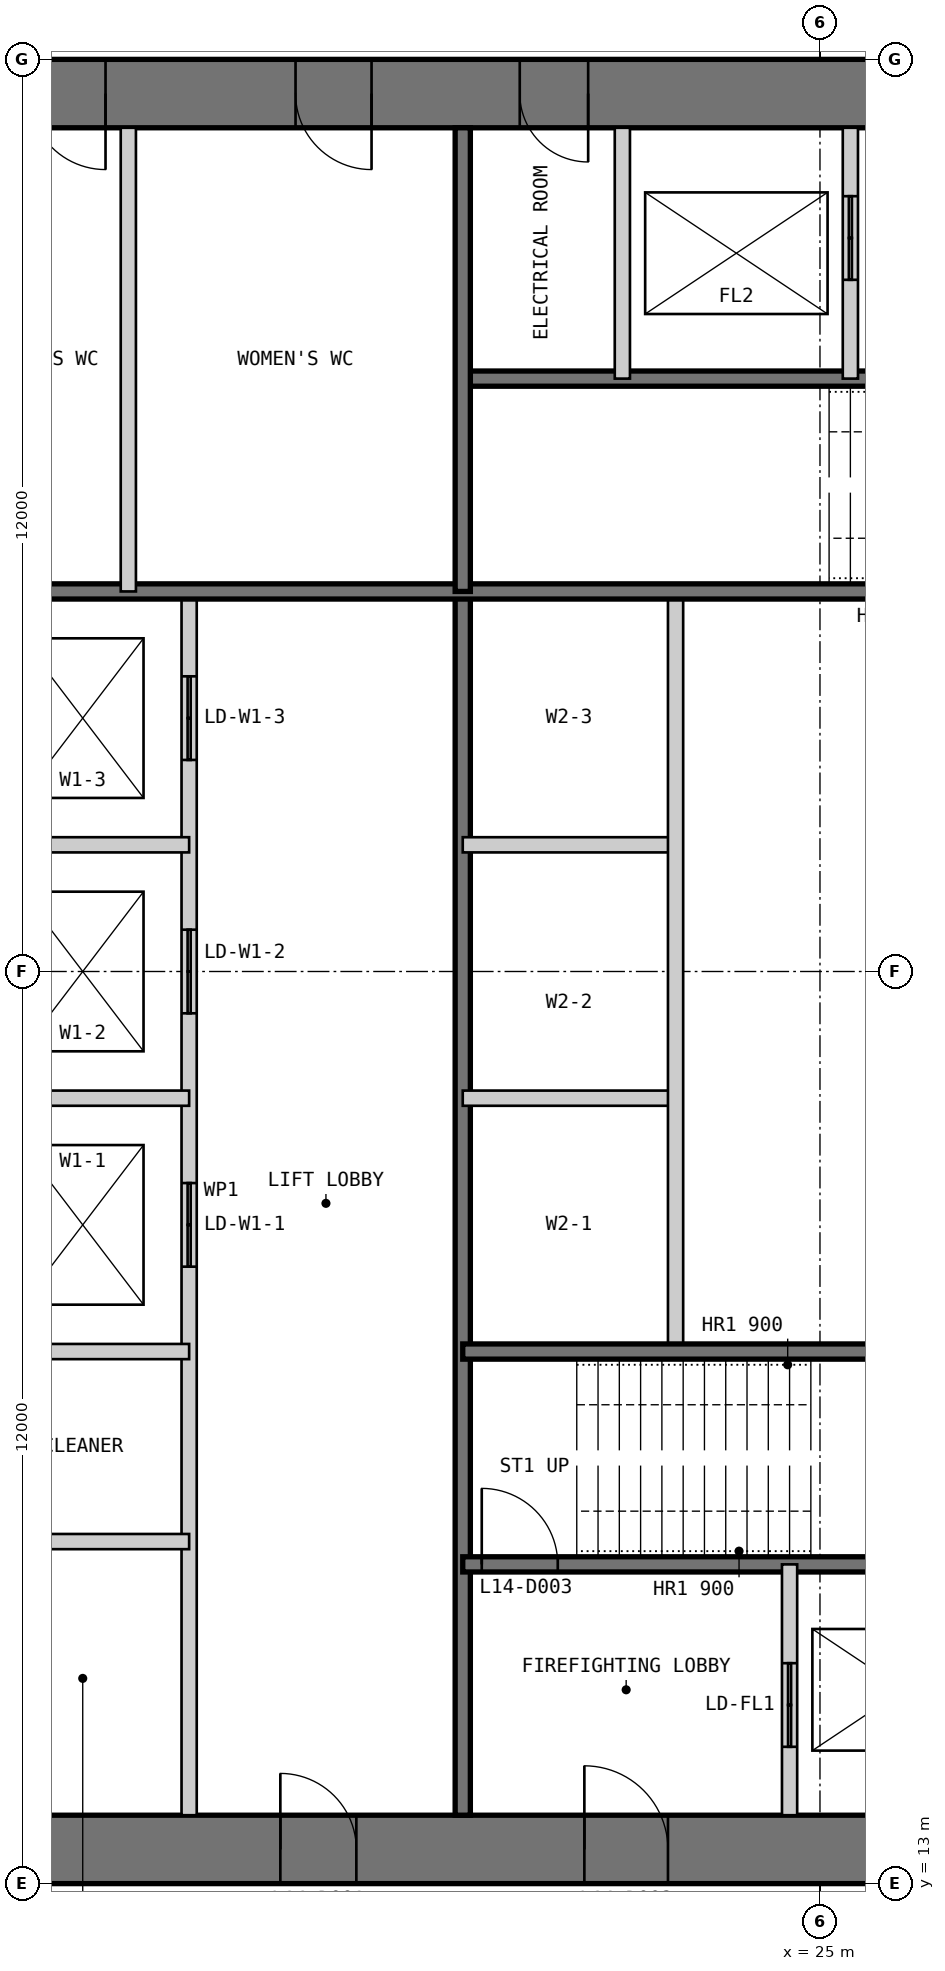
"""IFC4 building model, lengths in metres.
Left out: names, types, materials, properties, quantities, classifications, styles, units other than length and angle.
Written with IfcOpenShell. Run it as: python <this file> out.ifc"""

import sys

from ifc_helpers import new_model, si_unit, direction, frame, frame_2d, origin, place, context, subcontext, project, spatial, polyline, rectangle, outline, extrude, element, fill, save


model = new_model("IFC4")
c1 = context("Model", 3, precision=1e-05, world=origin(), true_north=direction((0.0, 1.0)))
c2 = subcontext(c1, "Body", "Model", "MODEL_VIEW")
j1 = project(units=[si_unit("LENGTHUNIT", "METRE"), si_unit("PLANEANGLEUNIT", "RADIAN")], contexts=[c1])
p1 = place(None, origin())
s1 = spatial("IfcSite", under=j1, at=p1, CompositionType="ELEMENT")
p2 = place(p1, origin())
s2 = spatial("IfcBuilding", under=s1, at=p2, CompositionType="ELEMENT")
p3 = place(p2, frame((0.0, 0.0, 63.0)))
s3 = spatial("IfcBuildingStorey", under=s2, at=p3, CompositionType="ELEMENT", Elevation=63.0)
p4 = place(p3, frame((13.0, 13.45, 0.0), z_axis=(0.0, 0.0, 1.0), x_axis=(1.0, 0.0, 0.0)))
e1 = element("IfcWall", 1, at=p4, inside=s3, PredefinedType="SHEAR", context=c2, shape_type="SweptSolid", body=[
    extrude(outline(polyline([(0.0, -0.45), (24.0, -0.45), (23.1, 0.45), (0.9, 0.45), (0.0, -0.45)])), origin(), (0.0, 0.0, 1.0), 4.0),
])
p5 = place(p4, frame((4.9, 0.0, 0.0)))
e2 = element("IfcOpeningElement", 2, at=p5, cuts=e1, PredefinedType="OPENING", context=c2, shape_type="SweptSolid", body=[
    extrude(rectangle(XDim=1.0, YDim=2.2, at=frame_2d((0.5, 1.1))), frame((0.0, 0.46, 0.0), z_axis=(0.0, -1.0, 0.0), x_axis=(1.0, 0.0, 0.0)), (0.0, 0.0, 1.0), 0.92),
])
p6 = place(p4, frame((8.9, 0.0, 0.0)))
e3 = element("IfcOpeningElement", 3, at=p6, cuts=e1, PredefinedType="OPENING", context=c2, shape_type="SweptSolid", body=[
    extrude(rectangle(XDim=1.1, YDim=2.2, at=frame_2d((0.55, 1.1))), frame((0.0, 0.46, 0.0), z_axis=(0.0, -1.0, 0.0), x_axis=(1.0, 0.0, 0.0)), (0.0, 0.0, 1.0), 0.92),
])
p7 = place(p4, frame((15.05, 0.0, 0.0)))
e4 = element("IfcOpeningElement", 4, at=p7, cuts=e1, PredefinedType="OPENING", context=c2, shape_type="SweptSolid", body=[
    extrude(rectangle(XDim=0.9, YDim=2.2, at=frame_2d((0.45, 1.1))), frame((0.0, 0.46, 0.0), z_axis=(0.0, -1.0, 0.0), x_axis=(1.0, 0.0, 0.0)), (0.0, 0.0, 1.0), 0.92),
])
p8 = place(p4, frame((17.9, 0.0, 0.0)))
e5 = element("IfcOpeningElement", 5, at=p8, cuts=e1, PredefinedType="OPENING", context=c2, shape_type="SweptSolid", body=[
    extrude(rectangle(XDim=1.0, YDim=2.2, at=frame_2d((0.5, 1.1))), frame((0.0, 0.46, 0.0), z_axis=(0.0, -1.0, 0.0), x_axis=(1.0, 0.0, 0.0)), (0.0, 0.0, 1.0), 0.92),
])
p9 = place(p4, frame((21.4, 0.0, 0.0)))
e6 = element("IfcOpeningElement", 6, at=p9, cuts=e1, PredefinedType="OPENING", context=c2, shape_type="SweptSolid", body=[
    extrude(rectangle(XDim=1.0, YDim=2.2, at=frame_2d((0.5, 1.1))), frame((0.0, 0.46, 0.0), z_axis=(0.0, -1.0, 0.0), x_axis=(1.0, 0.0, 0.0)), (0.0, 0.0, 1.0), 0.92),
])
p10 = place(p3, frame((37.0, 36.55, 0.0), z_axis=(0.0, 0.0, 1.0), x_axis=(-1.0, 0.0, 0.0)))
e7 = element("IfcWall", 7, at=p10, inside=s3, PredefinedType="SHEAR", context=c2, shape_type="SweptSolid", body=[
    extrude(outline(polyline([(0.0, -0.45), (24.0, -0.45), (23.1, 0.45), (0.9, 0.45), (0.0, -0.45)])), origin(), (0.0, 0.0, 1.0), 4.0),
])
p11 = place(p10, frame((4.9, 0.0, 0.0)))
e8 = element("IfcOpeningElement", 8, at=p11, cuts=e7, PredefinedType="OPENING", context=c2, shape_type="SweptSolid", body=[
    extrude(rectangle(XDim=1.0, YDim=2.2, at=frame_2d((0.5, 1.1))), frame((0.0, 0.46, 0.0), z_axis=(0.0, -1.0, 0.0), x_axis=(1.0, 0.0, 0.0)), (0.0, 0.0, 1.0), 0.92),
])
p12 = place(p10, frame((8.9, 0.0, 0.0)))
e9 = element("IfcOpeningElement", 9, at=p12, cuts=e7, PredefinedType="OPENING", context=c2, shape_type="SweptSolid", body=[
    extrude(rectangle(XDim=1.1, YDim=2.2, at=frame_2d((0.55, 1.1))), frame((0.0, 0.46, 0.0), z_axis=(0.0, -1.0, 0.0), x_axis=(1.0, 0.0, 0.0)), (0.0, 0.0, 1.0), 0.92),
])
p13 = place(p10, frame((15.05, 0.0, 0.0)))
e10 = element("IfcOpeningElement", 10, at=p13, cuts=e7, PredefinedType="OPENING", context=c2, shape_type="SweptSolid", body=[
    extrude(rectangle(XDim=0.9, YDim=2.2, at=frame_2d((0.45, 1.1))), frame((0.0, 0.46, 0.0), z_axis=(0.0, -1.0, 0.0), x_axis=(1.0, 0.0, 0.0)), (0.0, 0.0, 1.0), 0.92),
])
p14 = place(p10, frame((17.9, 0.0, 0.0)))
e11 = element("IfcOpeningElement", 11, at=p14, cuts=e7, PredefinedType="OPENING", context=c2, shape_type="SweptSolid", body=[
    extrude(rectangle(XDim=1.0, YDim=2.2, at=frame_2d((0.5, 1.1))), frame((0.0, 0.46, 0.0), z_axis=(0.0, -1.0, 0.0), x_axis=(1.0, 0.0, 0.0)), (0.0, 0.0, 1.0), 0.92),
])
p15 = place(p10, frame((21.4, 0.0, 0.0)))
e12 = element("IfcOpeningElement", 12, at=p15, cuts=e7, PredefinedType="OPENING", context=c2, shape_type="SweptSolid", body=[
    extrude(rectangle(XDim=1.0, YDim=2.2, at=frame_2d((0.5, 1.1))), frame((0.0, 0.46, 0.0), z_axis=(0.0, -1.0, 0.0), x_axis=(1.0, 0.0, 0.0)), (0.0, 0.0, 1.0), 0.92),
])
p16 = place(p3, frame((16.7, 13.9, 0.0), z_axis=(0.0, 0.0, 1.0), x_axis=(0.0, 1.0, 0.0)))
e13 = element("IfcWall", 13, at=p16, inside=s3, PredefinedType="PARTITIONING", context=c2, shape_type="SweptSolid", body=[
    extrude(rectangle(XDim=16.1, YDim=0.2, at=frame_2d((8.05, 0.0))), origin(), (0.0, 0.0, 1.0), 3.8),
])
p17 = place(p16, frame((7.217, 0.0, 0.0)))
e14 = element("IfcOpeningElement", 14, at=p17, cuts=e13, PredefinedType="OPENING", context=c2, shape_type="SweptSolid", body=[
    extrude(rectangle(XDim=1.1, YDim=2.2, at=frame_2d((0.55, 1.1))), frame((0.0, 0.11, 0.0), z_axis=(0.0, -1.0, 0.0), x_axis=(1.0, 0.0, 0.0)), (0.0, 0.0, 1.0), 0.22),
])
p18 = place(p16, frame((10.55, 0.0, 0.0)))
e15 = element("IfcOpeningElement", 15, at=p18, cuts=e13, PredefinedType="OPENING", context=c2, shape_type="SweptSolid", body=[
    extrude(rectangle(XDim=1.1, YDim=2.2, at=frame_2d((0.55, 1.1))), frame((0.0, 0.11, 0.0), z_axis=(0.0, -1.0, 0.0), x_axis=(1.0, 0.0, 0.0)), (0.0, 0.0, 1.0), 0.22),
])
p19 = place(p16, frame((13.883, 0.0, 0.0)))
e16 = element("IfcOpeningElement", 16, at=p19, cuts=e13, PredefinedType="OPENING", context=c2, shape_type="SweptSolid", body=[
    extrude(rectangle(XDim=1.1, YDim=2.2, at=frame_2d((0.55, 1.1))), frame((0.0, 0.11, 0.0), z_axis=(0.0, -1.0, 0.0), x_axis=(1.0, 0.0, 0.0)), (0.0, 0.0, 1.0), 0.22),
])
p20 = place(p3, frame((20.3, 13.9, 0.0), z_axis=(0.0, 0.0, 1.0), x_axis=(0.0, 1.0, 0.0)))
e17 = element("IfcWall", 17, at=p20, inside=s3, PredefinedType="SOLIDWALL", context=c2, shape_type="SweptSolid", body=[
    extrude(rectangle(XDim=16.1, YDim=0.2, at=frame_2d((8.05, 0.0))), origin(), (0.0, 0.0, 1.0), 3.8),
])
for number, where, z_axis, x_axis in (
    (18, (13.9, 20.0, 0.0), (0.0, 0.0, 1.0), (1.0, 0.0, 0.0)),
    (19, (13.9, 23.333, 0.0), (0.0, 0.0, 1.0), (1.0, 0.0, 0.0)),
    (20, (13.9, 26.667, 0.0), (0.0, 0.0, 1.0), (1.0, 0.0, 0.0)),
    (21, (20.3, 23.333, 0.0), (0.0, 0.0, 1.0), (1.0, 0.0, 0.0)),
    (22, (20.3, 26.667, 0.0), (0.0, 0.0, 1.0), (1.0, 0.0, 0.0)),
):
    element("IfcWall", number, at=place(p3, frame(where, z_axis=z_axis, x_axis=x_axis)), inside=s3, PredefinedType="PARTITIONING", context=c2, shape_type="SweptSolid", body=[
        extrude(rectangle(XDim=2.8, YDim=0.2, at=frame_2d((1.4, 0.0))), origin(), (0.0, 0.0, 1.0), 3.8),
    ])
p21 = place(p3, frame((23.1, 20.0, 0.0), z_axis=(0.0, 0.0, 1.0), x_axis=(0.0, 1.0, 0.0)))
e23 = element("IfcWall", 23, at=p21, inside=s3, PredefinedType="PARTITIONING", context=c2, shape_type="SweptSolid", body=[
    extrude(rectangle(XDim=10.0, YDim=0.2, at=frame_2d((5.0, 0.0))), origin(), (0.0, 0.0, 1.0), 3.8),
])
p22 = place(p3, frame((20.3, 17.2, 0.0), z_axis=(0.0, 0.0, 1.0), x_axis=(1.0, 0.0, 0.0)))
e24 = element("IfcWall", 24, at=p22, inside=s3, PredefinedType="SOLIDWALL", context=c2, shape_type="SweptSolid", body=[
    extrude(rectangle(XDim=9.4, YDim=0.2, at=frame_2d((4.7, 0.0))), origin(), (0.0, 0.0, 1.0), 3.8),
])
p23 = place(p22, frame((0.25, 0.0, 0.0)))
e25 = element("IfcOpeningElement", 25, at=p23, cuts=e24, PredefinedType="OPENING", context=c2, shape_type="SweptSolid", body=[
    extrude(rectangle(XDim=1.0, YDim=2.2, at=frame_2d((0.5, 1.1))), frame((0.0, 0.11, 0.0), z_axis=(0.0, -1.0, 0.0), x_axis=(1.0, 0.0, 0.0)), (0.0, 0.0, 1.0), 0.22),
])
p24 = place(p3, frame((20.3, 20.0, 0.0), z_axis=(0.0, 0.0, 1.0), x_axis=(1.0, 0.0, 0.0)))
e26 = element("IfcWall", 26, at=p24, inside=s3, PredefinedType="SOLIDWALL", context=c2, shape_type="SweptSolid", body=[
    extrude(rectangle(XDim=15.8, YDim=0.2, at=frame_2d((7.9, 0.0))), origin(), (0.0, 0.0, 1.0), 3.8),
])
p25 = place(p3, frame((24.6, 13.9, 0.0), z_axis=(0.0, 0.0, 1.0), x_axis=(0.0, 1.0, 0.0)))
e27 = element("IfcWall", 27, at=p25, inside=s3, PredefinedType="PARTITIONING", context=c2, shape_type="SweptSolid", body=[
    extrude(rectangle(XDim=3.3, YDim=0.2, at=frame_2d((1.65, 0.0))), origin(), (0.0, 0.0, 1.0), 3.8),
])
p26 = place(p25, frame((0.9, 0.0, 0.0)))
e28 = element("IfcOpeningElement", 28, at=p26, cuts=e27, PredefinedType="OPENING", context=c2, shape_type="SweptSolid", body=[
    extrude(rectangle(XDim=1.1, YDim=2.2, at=frame_2d((0.55, 1.1))), frame((0.0, 0.11, 0.0), z_axis=(0.0, -1.0, 0.0), x_axis=(1.0, 0.0, 0.0)), (0.0, 0.0, 1.0), 0.22),
])
p27 = place(p3, frame((13.9, 17.5, 0.0), z_axis=(0.0, 0.0, 1.0), x_axis=(1.0, 0.0, 0.0)))
e29 = element("IfcWall", 29, at=p27, inside=s3, PredefinedType="PARTITIONING", context=c2, shape_type="SweptSolid", body=[
    extrude(rectangle(XDim=2.8, YDim=0.2, at=frame_2d((1.4, 0.0))), origin(), (0.0, 0.0, 1.0), 3.8),
])
p28 = place(p3, frame((29.7, 32.8, 0.0), z_axis=(0.0, 0.0, 1.0), x_axis=(-1.0, 0.0, 0.0)))
e30 = element("IfcWall", 30, at=p28, inside=s3, PredefinedType="SOLIDWALL", context=c2, shape_type="SweptSolid", body=[
    extrude(rectangle(XDim=9.4, YDim=0.2, at=frame_2d((4.7, 0.0))), origin(), (0.0, 0.0, 1.0), 3.8),
])
p29 = place(p28, frame((0.25, 0.0, 0.0)))
e31 = element("IfcOpeningElement", 31, at=p29, cuts=e30, PredefinedType="OPENING", context=c2, shape_type="SweptSolid", body=[
    extrude(rectangle(XDim=1.0, YDim=2.2, at=frame_2d((0.5, 1.1))), frame((0.0, 0.11, 0.0), z_axis=(0.0, -1.0, 0.0), x_axis=(1.0, 0.0, 0.0)), (0.0, 0.0, 1.0), 0.22),
])
p30 = place(p3, frame((29.7, 30.0, 0.0), z_axis=(0.0, 0.0, 1.0), x_axis=(-1.0, 0.0, 0.0)))
e32 = element("IfcWall", 32, at=p30, inside=s3, PredefinedType="SOLIDWALL", context=c2, shape_type="SweptSolid", body=[
    extrude(rectangle(XDim=15.8, YDim=0.2, at=frame_2d((7.9, 0.0))), origin(), (0.0, 0.0, 1.0), 3.8),
])
p31 = place(p3, frame((25.4, 36.1, 0.0), z_axis=(0.0, 0.0, 1.0), x_axis=(0.0, -1.0, 0.0)))
e33 = element("IfcWall", 33, at=p31, inside=s3, PredefinedType="PARTITIONING", context=c2, shape_type="SweptSolid", body=[
    extrude(rectangle(XDim=3.3, YDim=0.2, at=frame_2d((1.65, 0.0))), origin(), (0.0, 0.0, 1.0), 3.8),
])
p32 = place(p31, frame((0.9, 0.0, 0.0)))
e34 = element("IfcOpeningElement", 34, at=p32, cuts=e33, PredefinedType="OPENING", context=c2, shape_type="SweptSolid", body=[
    extrude(rectangle(XDim=1.1, YDim=2.2, at=frame_2d((0.55, 1.1))), frame((0.0, 0.11, 0.0), z_axis=(0.0, -1.0, 0.0), x_axis=(1.0, 0.0, 0.0)), (0.0, 0.0, 1.0), 0.22),
])
p33 = place(p3, frame((22.4, 36.1, 0.0), z_axis=(0.0, 0.0, 1.0), x_axis=(0.0, -1.0, 0.0)))
e35 = element("IfcWall", 35, at=p33, inside=s3, PredefinedType="PARTITIONING", context=c2, shape_type="SweptSolid", body=[
    extrude(rectangle(XDim=3.3, YDim=0.2, at=frame_2d((1.65, 0.0))), origin(), (0.0, 0.0, 1.0), 3.8),
])
p34 = place(p3, frame((20.3, 36.1, 0.0), z_axis=(0.0, 0.0, 1.0), x_axis=(0.0, -1.0, 0.0)))
e36 = element("IfcWall", 36, at=p34, inside=s3, PredefinedType="SOLIDWALL", context=c2, shape_type="SweptSolid", body=[
    extrude(rectangle(XDim=6.1, YDim=0.2, at=frame_2d((3.05, 0.0))), origin(), (0.0, 0.0, 1.0), 3.8),
])
p35 = place(p3, frame((15.9, 36.1, 0.0), z_axis=(0.0, 0.0, 1.0), x_axis=(0.0, -1.0, 0.0)))
e37 = element("IfcWall", 37, at=p35, inside=s3, PredefinedType="PARTITIONING", context=c2, shape_type="SweptSolid", body=[
    extrude(rectangle(XDim=6.1, YDim=0.2, at=frame_2d((3.05, 0.0))), origin(), (0.0, 0.0, 1.0), 3.8),
])
p36 = place(p5, origin())
e38 = element("IfcDoor", 38, at=p36, inside=s3, OperationType="SINGLE_SWING_LEFT", PredefinedType="DOOR", context=c2, shape_type="SweptSolid", body=[
    extrude(rectangle(XDim=1.0, YDim=2.2, at=frame_2d((0.5, 1.1))), frame((0.0, 0.025, 0.0), z_axis=(0.0, -1.0, 0.0), x_axis=(1.0, 0.0, 0.0)), (0.0, 0.0, 1.0), 0.05),
    extrude(outline(polyline([(0.0, 0.0), (0.04, 0.0), (0.04, 2.16), (0.96, 2.16), (0.96, 0.0), (1.0, 0.0), (1.0, 2.2), (0.0, 2.2), (0.0, 0.0)])), frame((0.0, 0.3, 0.0), z_axis=(0.0, -1.0, 0.0), x_axis=(1.0, 0.0, 0.0)), (0.0, 0.0, 1.0), 0.6),
])
fill(e2, e38)
p37 = place(p6, origin())
e39 = element("IfcDoor", 39, at=p37, inside=s3, OperationType="SINGLE_SWING_LEFT", PredefinedType="DOOR", context=c2, shape_type="SweptSolid", body=[
    extrude(rectangle(XDim=1.1, YDim=2.2, at=frame_2d((0.55, 1.1))), frame((0.0, 0.025, 0.0), z_axis=(0.0, -1.0, 0.0), x_axis=(1.0, 0.0, 0.0)), (0.0, 0.0, 1.0), 0.05),
    extrude(outline(polyline([(0.0, 0.0), (0.04, 0.0), (0.04, 2.16), (1.06, 2.16), (1.06, 0.0), (1.1, 0.0), (1.1, 2.2), (0.0, 2.2), (0.0, 0.0)])), frame((0.0, 0.3, 0.0), z_axis=(0.0, -1.0, 0.0), x_axis=(1.0, 0.0, 0.0)), (0.0, 0.0, 1.0), 0.6),
])
fill(e3, e39)
p38 = place(p23, origin())
e40 = element("IfcDoor", 40, at=p38, inside=s3, OperationType="SINGLE_SWING_LEFT", PredefinedType="DOOR", context=c2, shape_type="SweptSolid", body=[
    extrude(rectangle(XDim=1.0, YDim=2.2, at=frame_2d((0.5, 1.1))), frame((0.0, 0.025, 0.0), z_axis=(0.0, -1.0, 0.0), x_axis=(1.0, 0.0, 0.0)), (0.0, 0.0, 1.0), 0.05),
])
fill(e25, e40)
p39 = place(p13, origin())
e41 = element("IfcDoor", 41, at=p39, inside=s3, OperationType="SINGLE_SWING_LEFT", PredefinedType="DOOR", context=c2, shape_type="SweptSolid", body=[
    extrude(rectangle(XDim=0.9, YDim=2.2, at=frame_2d((0.45, 1.1))), frame((0.0, 0.025, 0.0), z_axis=(0.0, -1.0, 0.0), x_axis=(1.0, 0.0, 0.0)), (0.0, 0.0, 1.0), 0.05),
    extrude(outline(polyline([(0.0, 0.0), (0.04, 0.0), (0.04, 2.16), (0.86, 2.16), (0.86, 0.0), (0.9, 0.0), (0.9, 2.2), (0.0, 2.2), (0.0, 0.0)])), frame((0.0, 0.3, 0.0), z_axis=(0.0, -1.0, 0.0), x_axis=(1.0, 0.0, 0.0)), (0.0, 0.0, 1.0), 0.6),
])
fill(e10, e41)
p40 = place(p14, origin())
e42 = element("IfcDoor", 42, at=p40, inside=s3, OperationType="SINGLE_SWING_LEFT", PredefinedType="DOOR", context=c2, shape_type="SweptSolid", body=[
    extrude(rectangle(XDim=1.0, YDim=2.2, at=frame_2d((0.5, 1.1))), frame((0.0, 0.025, 0.0), z_axis=(0.0, -1.0, 0.0), x_axis=(1.0, 0.0, 0.0)), (0.0, 0.0, 1.0), 0.05),
    extrude(outline(polyline([(0.0, 0.0), (0.04, 0.0), (0.04, 2.16), (0.96, 2.16), (0.96, 0.0), (1.0, 0.0), (1.0, 2.2), (0.0, 2.2), (0.0, 0.0)])), frame((0.0, 0.3, 0.0), z_axis=(0.0, -1.0, 0.0), x_axis=(1.0, 0.0, 0.0)), (0.0, 0.0, 1.0), 0.6),
])
fill(e11, e42)
p41 = place(p15, origin())
e43 = element("IfcDoor", 43, at=p41, inside=s3, OperationType="SINGLE_SWING_LEFT", PredefinedType="DOOR", context=c2, shape_type="SweptSolid", body=[
    extrude(rectangle(XDim=1.0, YDim=2.2, at=frame_2d((0.5, 1.1))), frame((0.0, 0.025, 0.0), z_axis=(0.0, -1.0, 0.0), x_axis=(1.0, 0.0, 0.0)), (0.0, 0.0, 1.0), 0.05),
    extrude(outline(polyline([(0.0, 0.0), (0.04, 0.0), (0.04, 2.16), (0.96, 2.16), (0.96, 0.0), (1.0, 0.0), (1.0, 2.2), (0.0, 2.2), (0.0, 0.0)])), frame((0.0, 0.3, 0.0), z_axis=(0.0, -1.0, 0.0), x_axis=(1.0, 0.0, 0.0)), (0.0, 0.0, 1.0), 0.6),
])
fill(e12, e43)
p42 = place(p26, origin())
e44 = element("IfcDoor", 44, at=p42, inside=s3, OperationType="DOUBLE_DOOR_SLIDING", PredefinedType="DOOR", context=c2, shape_type="SweptSolid", body=[
    extrude(rectangle(XDim=1.1, YDim=2.2, at=frame_2d((0.55, 1.1))), frame((0.0, 0.025, 0.0), z_axis=(0.0, -1.0, 0.0), x_axis=(1.0, 0.0, 0.0)), (0.0, 0.0, 1.0), 0.05),
])
fill(e28, e44)
p43 = place(p17, origin())
e45 = element("IfcDoor", 45, at=p43, inside=s3, OperationType="DOUBLE_DOOR_SLIDING", PredefinedType="DOOR", context=c2, shape_type="SweptSolid", body=[
    extrude(rectangle(XDim=1.1, YDim=2.2, at=frame_2d((0.55, 1.1))), frame((0.0, 0.025, 0.0), z_axis=(0.0, -1.0, 0.0), x_axis=(1.0, 0.0, 0.0)), (0.0, 0.0, 1.0), 0.05),
])
fill(e14, e45)
p44 = place(p18, origin())
e46 = element("IfcDoor", 46, at=p44, inside=s3, OperationType="DOUBLE_DOOR_SLIDING", PredefinedType="DOOR", context=c2, shape_type="SweptSolid", body=[
    extrude(rectangle(XDim=1.1, YDim=2.2, at=frame_2d((0.55, 1.1))), frame((0.0, 0.025, 0.0), z_axis=(0.0, -1.0, 0.0), x_axis=(1.0, 0.0, 0.0)), (0.0, 0.0, 1.0), 0.05),
])
fill(e15, e46)
p45 = place(p19, origin())
e47 = element("IfcDoor", 47, at=p45, inside=s3, OperationType="DOUBLE_DOOR_SLIDING", PredefinedType="DOOR", context=c2, shape_type="SweptSolid", body=[
    extrude(rectangle(XDim=1.1, YDim=2.2, at=frame_2d((0.55, 1.1))), frame((0.0, 0.025, 0.0), z_axis=(0.0, -1.0, 0.0), x_axis=(1.0, 0.0, 0.0)), (0.0, 0.0, 1.0), 0.05),
])
fill(e16, e47)
p46 = place(p32, origin())
e48 = element("IfcDoor", 48, at=p46, inside=s3, OperationType="DOUBLE_DOOR_SLIDING", PredefinedType="DOOR", context=c2, shape_type="SweptSolid", body=[
    extrude(rectangle(XDim=1.1, YDim=2.2, at=frame_2d((0.55, 1.1))), frame((0.0, 0.025, 0.0), z_axis=(0.0, -1.0, 0.0), x_axis=(1.0, 0.0, 0.0)), (0.0, 0.0, 1.0), 0.05),
])
fill(e34, e48)
save(model, sys.argv[1])
